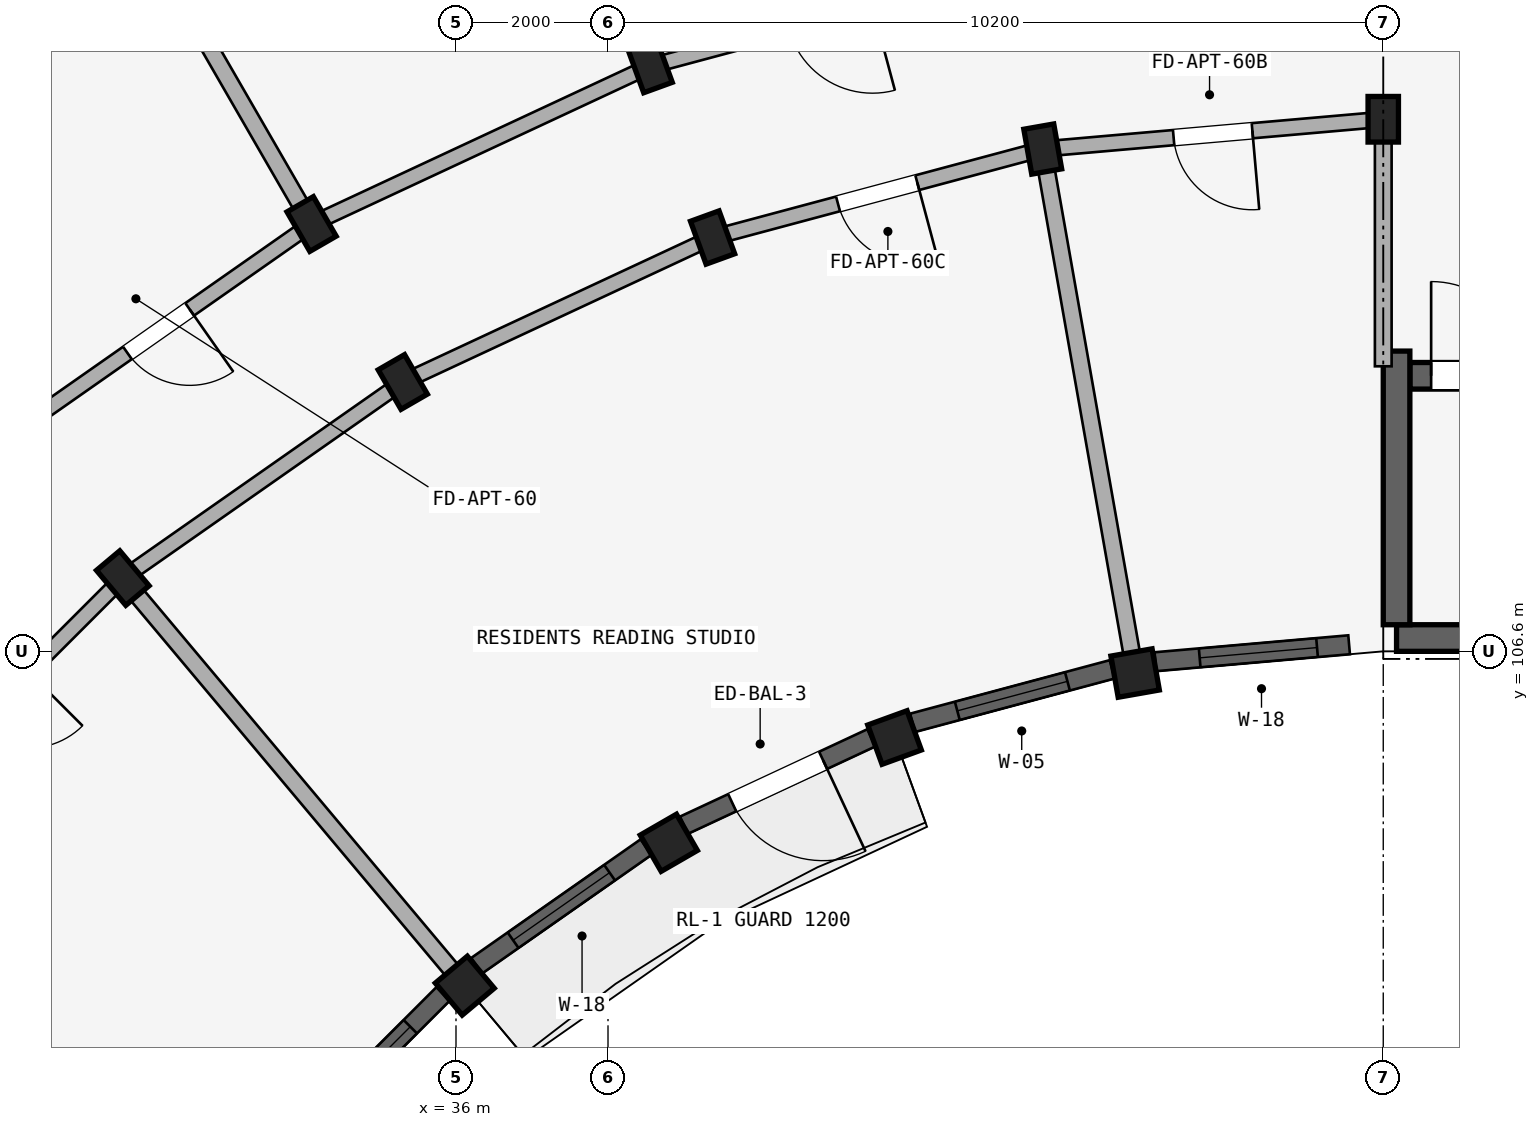
"""IFC4 building model, lengths in metres.
Left out: names, types, materials, properties, quantities, classifications, styles, units other than length and angle.
Written with IfcOpenShell. Run it as: python <this file> out.ifc"""

import sys

from ifc_helpers import new_model, si_unit, direction, frame, frame_2d, origin, origin_2d, place, context, subcontext, project, spatial, rectangle, extrude, element, fill, save


model = new_model("IFC4")
c1 = context("Model", 3, precision=1e-05, world=origin(), true_north=direction((0.0, 1.0)))
c2 = subcontext(c1, "Body", "Model", "MODEL_VIEW")
j1 = project(units=[si_unit("LENGTHUNIT", "METRE"), si_unit("PLANEANGLEUNIT", "RADIAN")], contexts=[c1])
p1 = place(None, origin())
s1 = spatial("IfcSite", under=j1, at=p1, CompositionType="ELEMENT")
p2 = place(p1, origin())
s2 = spatial("IfcBuilding", under=s1, at=p2, CompositionType="ELEMENT")
p3 = place(p2, frame((0.0, 0.0, 40.2)))
s3 = spatial("IfcBuildingStorey", under=s2, at=p3, CompositionType="ELEMENT", Elevation=40.2)
p4 = place(p3, frame((48.375, 106.775, 0.0), z_axis=(0.0, 0.0, 1.0), x_axis=(1.0, 0.0, 0.0)))
e1 = element("IfcWall", 1, at=p4, inside=s3, PredefinedType="SHEAR", context=c2, shape_type="SweptSolid", body=[
    extrude(rectangle(XDim=8.25, YDim=0.35, at=frame_2d((4.125, 0.0))), origin(), (0.0, 0.0, 1.0), 2.93),
])
p5 = place(p3, frame((48.55, 110.225, 0.0), z_axis=(0.0, 0.0, 1.0), x_axis=(1.0, 0.0, 0.0)))
e2 = element("IfcWall", 2, at=p5, inside=s3, PredefinedType="SHEAR", context=c2, shape_type="SweptSolid", body=[
    extrude(rectangle(XDim=7.9, YDim=0.35, at=frame_2d((3.95, 0.0))), origin(), (0.0, 0.0, 1.0), 2.93),
])
p6 = place(p5, frame((0.28, 0.0, 0.0)))
e3 = element("IfcOpeningElement", 3, at=p6, cuts=e2, PredefinedType="OPENING", context=c2, shape_type="SweptSolid", body=[
    extrude(rectangle(XDim=1.24, YDim=2.15, at=frame_2d((0.62, 1.075))), frame((0.0, 0.185, 0.0), z_axis=(0.0, -1.0, 0.0), x_axis=(1.0, 0.0, 0.0)), (0.0, 0.0, 1.0), 0.37),
])
p7 = place(p3, frame((48.375, 106.95, 0.0), z_axis=(0.0, 0.0, 1.0), x_axis=(0.0, 1.0, 0.0)))
e4 = element("IfcWall", 4, at=p7, inside=s3, PredefinedType="SHEAR", context=c2, shape_type="SweptSolid", body=[
    extrude(rectangle(XDim=3.6, YDim=0.35, at=frame_2d((1.8, 0.0))), origin(), (0.0, 0.0, 1.0), 2.93),
])
p8 = place(p3, frame((48.2, 113.6, 0.0), z_axis=(0.0, 0.0, 1.0), x_axis=(1.0, 0.0, 0.0)))
e5 = element("IfcColumn", 5, at=p8, inside=s3, PredefinedType="COLUMN", context=c2, shape_type="SweptSolid", body=[
    extrude(rectangle(XDim=0.4, YDim=0.6, at=origin_2d()), origin(), (0.0, 0.0, 1.0), 2.93),
])
p9 = place(p3, frame((44.935, 106.314, 0.0), z_axis=(0.0, 0.0, 1.0), x_axis=(0.984807753012, 0.173648177667, 0.0)))
e6 = element("IfcColumn", 6, at=p9, inside=s3, PredefinedType="COLUMN", context=c2, shape_type="SweptSolid", body=[
    extrude(rectangle(XDim=0.55, YDim=0.55, at=origin_2d()), origin(), (0.0, 0.0, 1.0), 2.93),
])
p10 = place(p3, frame((43.72, 113.208, 0.0), z_axis=(0.0, 0.0, 1.0), x_axis=(0.984807753012, 0.173648177667, 0.0)))
e7 = element("IfcColumn", 7, at=p10, inside=s3, PredefinedType="COLUMN", context=c2, shape_type="SweptSolid", body=[
    extrude(rectangle(XDim=0.4, YDim=0.6, at=origin_2d()), origin(), (0.0, 0.0, 1.0), 2.93),
])
p11 = place(p3, frame((41.77, 105.466, 0.0), z_axis=(0.0, 0.0, 1.0), x_axis=(0.939692620786, 0.342020143326, 0.0)))
e8 = element("IfcColumn", 8, at=p11, inside=s3, PredefinedType="COLUMN", context=c2, shape_type="SweptSolid", body=[
    extrude(rectangle(XDim=0.55, YDim=0.55, at=origin_2d()), origin(), (0.0, 0.0, 1.0), 2.93),
])
for number, where, z_axis, x_axis in (
    (9, (39.376, 112.044, 0.0), (0.0, 0.0, 1.0), (0.94, 0.342, 0.0)),
    (10, (38.555, 114.299, 0.0), (0.0, 0.0, 1.0), (0.94, 0.342, 0.0)),
):
    element("IfcColumn", number, at=place(p3, frame(where, z_axis=z_axis, x_axis=x_axis)), inside=s3, PredefinedType="COLUMN", context=c2, shape_type="SweptSolid", body=[
        extrude(rectangle(XDim=0.4, YDim=0.6, at=origin_2d()), origin(), (0.0, 0.0, 1.0), 2.93),
    ])
p12 = place(p3, frame((38.8, 104.081, 0.0), z_axis=(0.0, 0.0, 1.0), x_axis=(0.866025403784, 0.5, 0.0)))
e11 = element("IfcColumn", 11, at=p12, inside=s3, PredefinedType="COLUMN", context=c2, shape_type="SweptSolid", body=[
    extrude(rectangle(XDim=0.55, YDim=0.55, at=origin_2d()), origin(), (0.0, 0.0, 1.0), 2.93),
])
for number, where, z_axis, x_axis in (
    (12, (35.3, 110.144, 0.0), (0.0, 0.0, 1.0), (0.866, 0.5, 0.0)),
    (13, (34.1, 112.222, 0.0), (0.0, 0.0, 1.0), (0.866, 0.5, 0.0)),
):
    element("IfcColumn", number, at=place(p3, frame(where, z_axis=z_axis, x_axis=x_axis)), inside=s3, PredefinedType="COLUMN", context=c2, shape_type="SweptSolid", body=[
        extrude(rectangle(XDim=0.4, YDim=0.6, at=origin_2d()), origin(), (0.0, 0.0, 1.0), 2.93),
    ])
p13 = place(p3, frame((36.115, 102.202, 0.0), z_axis=(0.0, 0.0, 1.0), x_axis=(0.766044443119, 0.642787609687, 0.0)))
e14 = element("IfcColumn", 14, at=p13, inside=s3, PredefinedType="COLUMN", context=c2, shape_type="SweptSolid", body=[
    extrude(rectangle(XDim=0.55, YDim=0.55, at=origin_2d()), origin(), (0.0, 0.0, 1.0), 2.93),
])
p14 = place(p3, frame((31.616, 107.564, 0.0), z_axis=(0.0, 0.0, 1.0), x_axis=(0.766044443119, 0.642787609687, 0.0)))
e15 = element("IfcColumn", 15, at=p14, inside=s3, PredefinedType="COLUMN", context=c2, shape_type="SweptSolid", body=[
    extrude(rectangle(XDim=0.4, YDim=0.6, at=origin_2d()), origin(), (0.0, 0.0, 1.0), 2.93),
])
p15 = place(p3, frame((48.2, 113.6, 0.0), z_axis=(0.0, 0.0, 1.0), x_axis=(-0.996191949488, -0.087187153726, 0.0)))
e16 = element("IfcWall", 16, at=p15, inside=s3, PredefinedType="STANDARD", context=c2, shape_type="SweptSolid", body=[
    extrude(rectangle(XDim=4.497, YDim=0.2, at=frame_2d((2.249, 0.0))), origin(), (0.0, 0.0, 1.0), 2.372),
])
p16 = place(p15, frame((1.729, 0.0, 0.0)))
e17 = element("IfcOpeningElement", 17, at=p16, cuts=e16, PredefinedType="OPENING", context=c2, shape_type="SweptSolid", body=[
    extrude(rectangle(XDim=1.04, YDim=2.15, at=frame_2d((0.52, 1.075))), frame((0.0, 0.11, 0.0), z_axis=(0.0, -1.0, 0.0), x_axis=(1.0, 0.0, 0.0)), (0.0, 0.0, 1.0), 0.22),
])
p17 = place(p3, frame((43.72, 113.208, 0.0), z_axis=(0.0, 0.0, 1.0), x_axis=(-0.965934240054, -0.258787642463, 0.0)))
e18 = element("IfcWall", 18, at=p17, inside=s3, PredefinedType="STANDARD", context=c2, shape_type="SweptSolid", body=[
    extrude(rectangle(XDim=4.497, YDim=0.2, at=frame_2d((2.249, 0.0))), origin(), (0.0, 0.0, 1.0), 2.372),
])
p18 = place(p17, frame((1.709, 0.0, 0.0)))
e19 = element("IfcOpeningElement", 19, at=p18, cuts=e18, PredefinedType="OPENING", context=c2, shape_type="SweptSolid", body=[
    extrude(rectangle(XDim=1.08, YDim=2.15, at=frame_2d((0.54, 1.075))), frame((0.0, 0.11, 0.0), z_axis=(0.0, -1.0, 0.0), x_axis=(1.0, 0.0, 0.0)), (0.0, 0.0, 1.0), 0.22),
])
p19 = place(p3, frame((43.303, 115.572, 0.0), z_axis=(0.0, 0.0, 1.0), x_axis=(-0.965930095386, -0.258803112091, 0.0)))
e20 = element("IfcWall", 20, at=p19, inside=s3, PredefinedType="STANDARD", context=c2, shape_type="SweptSolid", body=[
    extrude(rectangle(XDim=4.916, YDim=0.2, at=frame_2d((2.458, 0.0))), origin(), (0.0, 0.0, 1.0), 2.372),
])
p20 = place(p19, frame((1.888, 0.0, 0.0)))
e21 = element("IfcOpeningElement", 21, at=p20, cuts=e20, PredefinedType="OPENING", context=c2, shape_type="SweptSolid", body=[
    extrude(rectangle(XDim=1.14, YDim=2.15, at=frame_2d((0.57, 1.075))), frame((0.0, 0.11, 0.0), z_axis=(0.0, -1.0, 0.0), x_axis=(1.0, 0.0, 0.0)), (0.0, 0.0, 1.0), 0.22),
])
p21 = place(p3, frame((39.376, 112.044, 0.0), z_axis=(0.0, 0.0, 1.0), x_axis=(-0.906307919131, -0.422617978463, 0.0)))
e22 = element("IfcWall", 22, at=p21, inside=s3, PredefinedType="STANDARD", context=c2, shape_type="SweptSolid", body=[
    extrude(rectangle(XDim=4.497, YDim=0.2, at=frame_2d((2.249, 0.0))), origin(), (0.0, 0.0, 1.0), 2.372),
])
p22 = place(p3, frame((38.555, 114.299, 0.0), z_axis=(0.0, 0.0, 1.0), x_axis=(-0.906302381024, -0.422629854778, 0.0)))
e23 = element("IfcWall", 23, at=p22, inside=s3, PredefinedType="STANDARD", context=c2, shape_type="SweptSolid", body=[
    extrude(rectangle(XDim=4.915, YDim=0.2, at=frame_2d((2.458, 0.0))), origin(), (0.0, 0.0, 1.0), 2.372),
])
p23 = place(p3, frame((35.3, 110.144, 0.0), z_axis=(0.0, 0.0, 1.0), x_axis=(-0.819155404658, -0.573571637217, 0.0)))
e24 = element("IfcWall", 24, at=p23, inside=s3, PredefinedType="STANDARD", context=c2, shape_type="SweptSolid", body=[
    extrude(rectangle(XDim=4.497, YDim=0.2, at=frame_2d((2.249, 0.0))), origin(), (0.0, 0.0, 1.0), 2.372),
])
p24 = place(p3, frame((34.1, 112.222, 0.0), z_axis=(0.0, 0.0, 1.0), x_axis=(-0.819140911474, -0.573592335331, 0.0)))
e25 = element("IfcWall", 25, at=p24, inside=s3, PredefinedType="STANDARD", context=c2, shape_type="SweptSolid", body=[
    extrude(rectangle(XDim=4.916, YDim=0.2, at=frame_2d((2.458, 0.0))), origin(), (0.0, 0.0, 1.0), 2.372),
])
p25 = place(p24, frame((1.958, 0.0, 0.0)))
e26 = element("IfcOpeningElement", 26, at=p25, cuts=e25, PredefinedType="OPENING", context=c2, shape_type="SweptSolid", body=[
    extrude(rectangle(XDim=1.0, YDim=2.15, at=frame_2d((0.5, 1.075))), frame((0.0, 0.11, 0.0), z_axis=(0.0, -1.0, 0.0), x_axis=(1.0, 0.0, 0.0)), (0.0, 0.0, 1.0), 0.22),
])
p26 = place(p3, frame((31.616, 107.564, 0.0), z_axis=(0.0, 0.0, 1.0), x_axis=(-0.707106781187, -0.707106781187, 0.0)))
e27 = element("IfcWall", 27, at=p26, inside=s3, PredefinedType="STANDARD", context=c2, shape_type="SweptSolid", body=[
    extrude(rectangle(XDim=4.497, YDim=0.2, at=frame_2d((2.249, 0.0))), origin(), (0.0, 0.0, 1.0), 2.372),
])
p27 = place(p26, frame((1.749, 0.0, 0.0)))
e28 = element("IfcOpeningElement", 28, at=p27, cuts=e27, PredefinedType="OPENING", context=c2, shape_type="SweptSolid", body=[
    extrude(rectangle(XDim=1.0, YDim=2.15, at=frame_2d((0.5, 1.075))), frame((0.0, 0.11, 0.0), z_axis=(0.0, -1.0, 0.0), x_axis=(1.0, 0.0, 0.0)), (0.0, 0.0, 1.0), 0.22),
])
p28 = place(p3, frame((48.2, 110.35, 0.0), z_axis=(0.0, 0.0, 1.0), x_axis=(0.0, 1.0, 0.0)))
e29 = element("IfcWall", 29, at=p28, inside=s3, PredefinedType="STANDARD", context=c2, shape_type="SweptSolid", body=[
    extrude(rectangle(XDim=3.2, YDim=0.22, at=frame_2d((1.6, 0.0))), origin(), (0.0, 0.0, 1.0), 2.372),
])
p29 = place(p3, frame((44.901, 106.511, 0.0), z_axis=(0.0, 0.0, 1.0), x_axis=(-0.173647089161, 0.984807944945, 0.0)))
e30 = element("IfcWall", 30, at=p29, inside=s3, PredefinedType="STANDARD", context=c2, shape_type="SweptSolid", body=[
    extrude(rectangle(XDim=6.75, YDim=0.22, at=frame_2d((3.375, 0.0))), origin(), (0.0, 0.0, 1.0), 2.372),
])
p30 = place(p3, frame((38.521, 114.393, 0.0), z_axis=(0.0, 0.0, 1.0), x_axis=(-0.342015232663, 0.939694408106, 0.0)))
e31 = element("IfcWall", 31, at=p30, inside=s3, PredefinedType="PARTITIONING", context=c2, shape_type="SweptSolid", body=[
    extrude(rectangle(XDim=14.62, YDim=0.125, at=frame_2d((7.31, 0.0))), origin(), (0.0, 0.0, 1.0), 2.372),
])
p31 = place(p30, frame((4.449, 0.0, 0.0)))
e32 = element("IfcOpeningElement", 32, at=p31, cuts=e31, PredefinedType="OPENING", context=c2, shape_type="SweptSolid", body=[
    extrude(rectangle(XDim=0.8, YDim=2.1, at=frame_2d((0.4, 1.05))), frame((0.0, 0.073, 0.0), z_axis=(0.0, -1.0, 0.0), x_axis=(1.0, 0.0, 0.0)), (0.0, 0.0, 1.0), 0.145),
])
p32 = place(p3, frame((34.05, 112.309, 0.0), z_axis=(0.0, 0.0, 1.0), x_axis=(-0.500007702989, 0.866020956416, 0.0)))
e33 = element("IfcWall", 33, at=p32, inside=s3, PredefinedType="STANDARD", context=c2, shape_type="SweptSolid", body=[
    extrude(rectangle(XDim=14.62, YDim=0.22, at=frame_2d((7.31, 0.0))), origin(), (0.0, 0.0, 1.0), 2.372),
])
p33 = place(p3, frame((35.987, 102.355, 0.0), z_axis=(0.0, 0.0, 1.0), x_axis=(-0.642784846501, 0.766046761698, 0.0)))
e34 = element("IfcWall", 34, at=p33, inside=s3, PredefinedType="STANDARD", context=c2, shape_type="SweptSolid", body=[
    extrude(rectangle(XDim=6.75, YDim=0.22, at=frame_2d((3.375, 0.0))), origin(), (0.0, 0.0, 1.0), 2.372),
])
p34 = place(p3, frame((47.751, 106.686, 0.0), z_axis=(0.0, 0.0, 1.0), x_axis=(-0.996188847542, -0.087222589008, 0.0)))
e35 = element("IfcWall", 35, at=p34, inside=s3, PredefinedType="STANDARD", context=c2, shape_type="SweptSolid", body=[
    extrude(rectangle(XDim=2.558, YDim=0.25, at=frame_2d((1.279, 0.0))), origin(), (0.0, 0.0, 1.0), 2.472),
])
p35 = place(p34, frame((0.424, 0.0, 0.672)))
e36 = element("IfcOpeningElement", 36, at=p35, cuts=e35, PredefinedType="OPENING", context=c2, shape_type="SweptSolid", body=[
    extrude(rectangle(XDim=1.55, YDim=1.6, at=frame_2d((0.775, 0.8))), frame((0.0, 0.135, 0.0), z_axis=(0.0, -1.0, 0.0), x_axis=(1.0, 0.0, 0.0)), (0.0, 0.0, 1.0), 0.27),
])
p36 = place(p3, frame((44.634, 106.363, 0.0), z_axis=(0.0, 0.0, 1.0), x_axis=(-0.965928818058, -0.258807879411, 0.0)))
e37 = element("IfcWall", 37, at=p36, inside=s3, PredefinedType="STANDARD", context=c2, shape_type="SweptSolid", body=[
    extrude(rectangle(XDim=2.72, YDim=0.25, at=frame_2d((1.36, 0.0))), origin(), (0.0, 0.0, 1.0), 2.472),
])
p37 = place(p36, frame((0.61, 0.0, 0.622)))
e38 = element("IfcOpeningElement", 38, at=p37, cuts=e37, PredefinedType="OPENING", context=c2, shape_type="SweptSolid", body=[
    extrude(rectangle(XDim=1.5, YDim=1.65, at=frame_2d((0.75, 0.825))), frame((0.0, 0.135, 0.0), z_axis=(0.0, -1.0, 0.0), x_axis=(1.0, 0.0, 0.0)), (0.0, 0.0, 1.0), 0.27),
])
p38 = place(p3, frame((41.465, 105.462, 0.0), z_axis=(0.0, 0.0, 1.0), x_axis=(-0.906302358412, -0.422629903269, 0.0)))
e39 = element("IfcWall", 39, at=p38, inside=s3, PredefinedType="STANDARD", context=c2, shape_type="SweptSolid", body=[
    extrude(rectangle(XDim=2.72, YDim=0.25, at=frame_2d((1.36, 0.0))), origin(), (0.0, 0.0, 1.0), 2.472),
])
p39 = place(p38, frame((0.7, 0.0, 0.0)))
e40 = element("IfcOpeningElement", 40, at=p39, cuts=e39, PredefinedType="OPENING", context=c2, shape_type="SweptSolid", body=[
    extrude(rectangle(XDim=1.32, YDim=2.15, at=frame_2d((0.66, 1.075))), frame((0.0, 0.135, 0.0), z_axis=(0.0, -1.0, 0.0), x_axis=(1.0, 0.0, 0.0)), (0.0, 0.0, 1.0), 0.27),
])
p40 = place(p3, frame((38.5, 104.024, 0.0), z_axis=(0.0, 0.0, 1.0), x_axis=(-0.819126475299, -0.573612950921, 0.0)))
e41 = element("IfcWall", 41, at=p40, inside=s3, PredefinedType="STANDARD", context=c2, shape_type="SweptSolid", body=[
    extrude(rectangle(XDim=2.72, YDim=0.25, at=frame_2d((1.36, 0.0))), origin(), (0.0, 0.0, 1.0), 2.472),
])
p41 = place(p40, frame((0.585, 0.0, 0.672)))
e42 = element("IfcOpeningElement", 42, at=p41, cuts=e41, PredefinedType="OPENING", context=c2, shape_type="SweptSolid", body=[
    extrude(rectangle(XDim=1.55, YDim=1.6, at=frame_2d((0.775, 0.8))), frame((0.0, 0.135, 0.0), z_axis=(0.0, -1.0, 0.0), x_axis=(1.0, 0.0, 0.0)), (0.0, 0.0, 1.0), 0.27),
])
p42 = place(p3, frame((35.83, 102.093, 0.0), z_axis=(0.0, 0.0, 1.0), x_axis=(-0.707106781187, -0.707106781187, 0.0)))
e43 = element("IfcWall", 43, at=p42, inside=s3, PredefinedType="STANDARD", context=c2, shape_type="SweptSolid", body=[
    extrude(rectangle(XDim=2.72, YDim=0.25, at=frame_2d((1.36, 0.0))), origin(), (0.0, 0.0, 1.0), 2.472),
])
p43 = place(p42, frame((0.61, 0.0, 0.622)))
e44 = element("IfcOpeningElement", 44, at=p43, cuts=e43, PredefinedType="OPENING", context=c2, shape_type="SweptSolid", body=[
    extrude(rectangle(XDim=1.5, YDim=1.65, at=frame_2d((0.75, 0.825))), frame((0.0, 0.135, 0.0), z_axis=(0.0, -1.0, 0.0), x_axis=(1.0, 0.0, 0.0)), (0.0, 0.0, 1.0), 0.27),
])
p44 = place(p35, origin())
e45 = element("IfcWindow", 45, at=p44, inside=s3, PartitioningType="DOUBLE_PANEL_VERTICAL", PredefinedType="WINDOW", context=c2, shape_type="SweptSolid", body=[
    extrude(rectangle(XDim=1.55, YDim=1.6, at=frame_2d((0.775, 0.8))), frame((0.0, 0.03, 0.0), z_axis=(0.0, -1.0, 0.0), x_axis=(1.0, 0.0, 0.0)), (0.0, 0.0, 1.0), 0.06),
])
fill(e36, e45)
p45 = place(p37, origin())
e46 = element("IfcWindow", 46, at=p45, inside=s3, PartitioningType="DOUBLE_PANEL_VERTICAL", PredefinedType="WINDOW", context=c2, shape_type="SweptSolid", body=[
    extrude(rectangle(XDim=1.5, YDim=1.65, at=frame_2d((0.75, 0.825))), frame((0.0, 0.03, 0.0), z_axis=(0.0, -1.0, 0.0), x_axis=(1.0, 0.0, 0.0)), (0.0, 0.0, 1.0), 0.06),
])
fill(e38, e46)
p46 = place(p41, origin())
e47 = element("IfcWindow", 47, at=p46, inside=s3, PartitioningType="DOUBLE_PANEL_VERTICAL", PredefinedType="WINDOW", context=c2, shape_type="SweptSolid", body=[
    extrude(rectangle(XDim=1.55, YDim=1.6, at=frame_2d((0.775, 0.8))), frame((0.0, 0.03, 0.0), z_axis=(0.0, -1.0, 0.0), x_axis=(1.0, 0.0, 0.0)), (0.0, 0.0, 1.0), 0.06),
])
fill(e42, e47)
p47 = place(p43, origin())
e48 = element("IfcWindow", 48, at=p47, inside=s3, PartitioningType="DOUBLE_PANEL_VERTICAL", PredefinedType="WINDOW", context=c2, shape_type="SweptSolid", body=[
    extrude(rectangle(XDim=1.5, YDim=1.65, at=frame_2d((0.75, 0.825))), frame((0.0, 0.03, 0.0), z_axis=(0.0, -1.0, 0.0), x_axis=(1.0, 0.0, 0.0)), (0.0, 0.0, 1.0), 0.06),
])
fill(e44, e48)
p48 = place(p6, frame((1.24, 0.0, 0.0), z_axis=(0.0, 0.0, 1.0), x_axis=(-1.0, 0.0, 0.0)))
e49 = element("IfcDoor", 49, at=p48, inside=s3, OperationType="SINGLE_SWING_RIGHT", PredefinedType="DOOR", context=c2, shape_type="SweptSolid", body=[
    extrude(rectangle(XDim=1.24, YDim=2.15, at=frame_2d((0.62, 1.075))), frame((0.0, 0.025, 0.0), z_axis=(0.0, -1.0, 0.0), x_axis=(1.0, 0.0, 0.0)), (0.0, 0.0, 1.0), 0.05),
])
fill(e3, e49)
p49 = place(p25, origin())
e50 = element("IfcDoor", 50, at=p49, inside=s3, OperationType="SINGLE_SWING_LEFT", PredefinedType="DOOR", context=c2, shape_type="SweptSolid", body=[
    extrude(rectangle(XDim=1.0, YDim=2.15, at=frame_2d((0.5, 1.075))), frame((0.0, 0.025, 0.0), z_axis=(0.0, -1.0, 0.0), x_axis=(1.0, 0.0, 0.0)), (0.0, 0.0, 1.0), 0.05),
])
fill(e26, e50)
p50 = place(p16, origin())
e51 = element("IfcDoor", 51, at=p50, inside=s3, OperationType="SINGLE_SWING_LEFT", PredefinedType="DOOR", context=c2, shape_type="SweptSolid", body=[
    extrude(rectangle(XDim=1.04, YDim=2.15, at=frame_2d((0.52, 1.075))), frame((0.0, 0.025, 0.0), z_axis=(0.0, -1.0, 0.0), x_axis=(1.0, 0.0, 0.0)), (0.0, 0.0, 1.0), 0.05),
])
fill(e17, e51)
p51 = place(p18, frame((1.08, 0.0, 0.0), z_axis=(0.0, 0.0, 1.0), x_axis=(-1.0, 0.0, 0.0)))
e52 = element("IfcDoor", 52, at=p51, inside=s3, OperationType="SINGLE_SWING_RIGHT", PredefinedType="DOOR", context=c2, shape_type="SweptSolid", body=[
    extrude(rectangle(XDim=1.08, YDim=2.15, at=frame_2d((0.54, 1.075))), frame((0.0, 0.025, 0.0), z_axis=(0.0, -1.0, 0.0), x_axis=(1.0, 0.0, 0.0)), (0.0, 0.0, 1.0), 0.05),
])
fill(e19, e52)
p52 = place(p39, origin())
e53 = element("IfcDoor", 53, at=p52, inside=s3, OperationType="SINGLE_SWING_LEFT", PredefinedType="DOOR", context=c2, shape_type="SweptSolid", body=[
    extrude(rectangle(XDim=1.32, YDim=2.15, at=frame_2d((0.66, 1.075))), frame((0.0, 0.025, 0.0), z_axis=(0.0, -1.0, 0.0), x_axis=(1.0, 0.0, 0.0)), (0.0, 0.0, 1.0), 0.05),
])
fill(e40, e53)
save(model, sys.argv[1])
